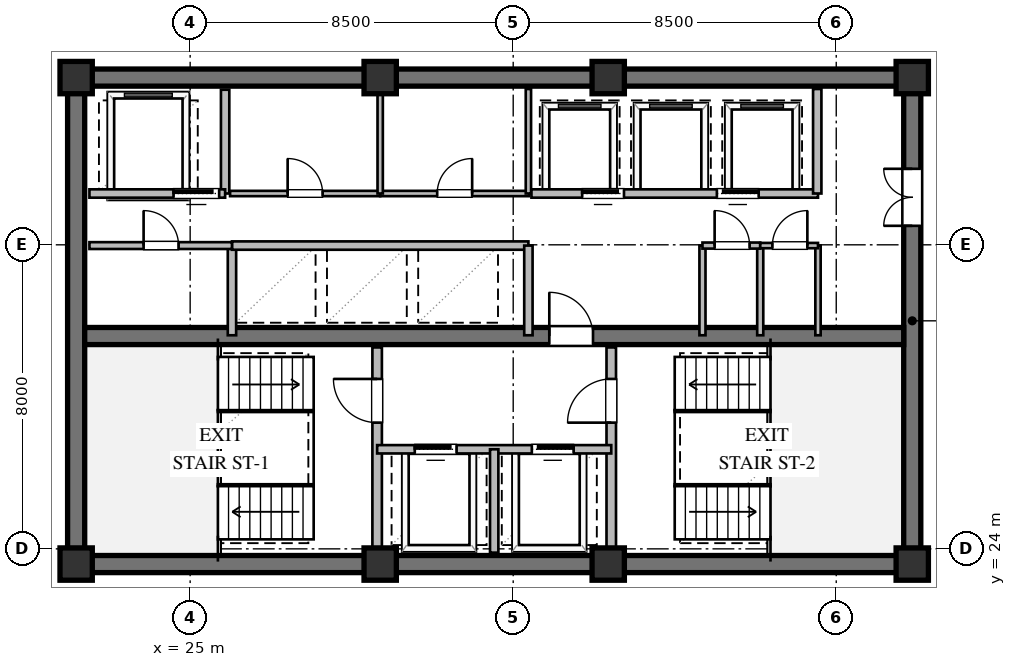
"""IFC4 building model, lengths in metres.
Left out: names, types, materials, properties, quantities, classifications, styles, units other than length and angle.
Written with IfcOpenShell. Run it as: python <this file> out.ifc"""

import sys

from ifc_helpers import new_model, si_unit, direction, frame, frame_2d, origin, origin_2d, place, context, subcontext, project, spatial, rectangle, extrude, element, fill, save


model = new_model("IFC4")
c1 = context("Model", 3, precision=1e-05, world=origin(), true_north=direction((0.0, 1.0)))
c2 = subcontext(c1, "Body", "Model", "MODEL_VIEW")
j1 = project(units=[si_unit("LENGTHUNIT", "METRE"), si_unit("PLANEANGLEUNIT", "RADIAN")], contexts=[c1])
p1 = place(None, origin())
s1 = spatial("IfcSite", under=j1, at=p1, CompositionType="ELEMENT")
p2 = place(p1, origin())
s2 = spatial("IfcBuilding", under=s1, at=p2, CompositionType="ELEMENT")
p3 = place(p2, frame((0.0, 0.0, 187.2)))
s3 = spatial("IfcBuildingStorey", under=s2, at=p3, CompositionType="ELEMENT", Elevation=187.2)
for number, where, z_axis, x_axis in (
    (1, (21.775, 23.6, 0.0), (0.0, 0.0, 1.0), (1.0, 0.0, 0.0)),
    (2, (21.775, 36.4, 0.0), (0.0, 0.0, 1.0), (1.0, 0.0, 0.0)),
):
    element("IfcWall", number, at=place(p3, frame(where, z_axis=z_axis, x_axis=x_axis)), inside=s3, PredefinedType="SHEAR", context=c2, shape_type="SweptSolid", body=[
        extrude(rectangle(XDim=22.45, YDim=0.45, at=frame_2d((11.225, 0.0))), origin(), (0.0, 0.0, 1.0), 3.28),
    ])
p4 = place(p3, frame((22.0, 23.825, 0.0), z_axis=(0.0, 0.0, 1.0), x_axis=(0.0, 1.0, 0.0)))
e3 = element("IfcWall", 3, at=p4, inside=s3, PredefinedType="SHEAR", context=c2, shape_type="SweptSolid", body=[
    extrude(rectangle(XDim=12.35, YDim=0.45, at=frame_2d((6.175, 0.0))), origin(), (0.0, 0.0, 1.0), 3.28),
])
p5 = place(p3, frame((44.0, 23.825, 0.0), z_axis=(0.0, 0.0, 1.0), x_axis=(0.0, 1.0, 0.0)))
e4 = element("IfcWall", 4, at=p5, inside=s3, PredefinedType="SHEAR", context=c2, shape_type="SweptSolid", body=[
    extrude(rectangle(XDim=12.35, YDim=0.45, at=frame_2d((6.175, 0.0))), origin(), (0.0, 0.0, 1.0), 3.28),
])
p6 = place(p5, frame((8.675, 0.0, 0.0)))
e5 = element("IfcOpeningElement", 5, at=p6, cuts=e4, PredefinedType="OPENING", context=c2, shape_type="SweptSolid", body=[
    extrude(rectangle(XDim=1.5, YDim=2.15, at=frame_2d((0.75, 1.075))), frame((0.0, 0.235, 0.0), z_axis=(0.0, -1.0, 0.0), x_axis=(1.0, 0.0, 0.0)), (0.0, 0.0, 1.0), 0.47),
])
p7 = place(p3, frame((22.225, 29.6, 0.0), z_axis=(0.0, 0.0, 1.0), x_axis=(1.0, 0.0, 0.0)))
e6 = element("IfcWall", 6, at=p7, inside=s3, PredefinedType="SHEAR", context=c2, shape_type="SweptSolid", body=[
    extrude(rectangle(XDim=21.55, YDim=0.45, at=frame_2d((10.775, 0.0))), origin(), (0.0, 0.0, 1.0), 3.28),
])
p8 = place(p7, frame((12.225, 0.0, 0.0)))
e7 = element("IfcOpeningElement", 7, at=p8, cuts=e6, PredefinedType="OPENING", context=c2, shape_type="SweptSolid", body=[
    extrude(rectangle(XDim=1.15, YDim=2.1, at=frame_2d((0.575, 1.05))), frame((0.0, 0.235, 0.0), z_axis=(0.0, -1.0, 0.0), x_axis=(1.0, 0.0, 0.0)), (0.0, 0.0, 1.0), 0.47),
])
for number, where, z_axis, x_axis in (
    (8, (22.0, 23.6, 0.0), (0.0, 0.0, 1.0), (1.0, 0.0, 0.0)),
    (9, (30.0, 23.6, 0.0), (0.0, 0.0, 1.0), (1.0, 0.0, 0.0)),
    (10, (36.0, 23.6, 0.0), (0.0, 0.0, 1.0), (1.0, 0.0, 0.0)),
    (11, (44.0, 23.6, 0.0), (0.0, 0.0, 1.0), (1.0, 0.0, 0.0)),
    (12, (44.0, 36.4, 0.0), (0.0, 0.0, 1.0), (1.0, 0.0, 0.0)),
    (13, (36.0, 36.4, 0.0), (0.0, 0.0, 1.0), (1.0, 0.0, 0.0)),
    (14, (30.0, 36.4, 0.0), (0.0, 0.0, 1.0), (1.0, 0.0, 0.0)),
    (15, (22.0, 36.4, 0.0), (0.0, 0.0, 1.0), (1.0, 0.0, 0.0)),
):
    element("IfcColumn", number, at=place(p3, frame(where, z_axis=z_axis, x_axis=x_axis)), inside=s3, PredefinedType="COLUMN", context=c2, shape_type="SweptSolid", body=[
        extrude(rectangle(XDim=0.85, YDim=0.85, at=origin_2d()), origin(), (0.0, 0.0, 1.0), 3.6),
    ])
p9 = place(p3, frame((29.92, 23.9, 0.0), z_axis=(0.0, 0.0, 1.0), x_axis=(0.0, 1.0, 0.0)))
e16 = element("IfcWall", 16, at=p9, inside=s3, PredefinedType="SOLIDWALL", context=c2, shape_type="SweptSolid", body=[
    extrude(rectangle(XDim=5.4, YDim=0.25, at=frame_2d((2.7, 0.0))), origin(), (0.0, 0.0, 1.0), 3.28),
])
p10 = place(p9, frame((3.421, 0.0, 0.0)))
e17 = element("IfcOpeningElement", 17, at=p10, cuts=e16, PredefinedType="OPENING", context=c2, shape_type="SweptSolid", body=[
    extrude(rectangle(XDim=1.15, YDim=2.1, at=frame_2d((0.575, 1.05))), frame((0.0, 0.135, 0.0), z_axis=(0.0, -1.0, 0.0), x_axis=(1.0, 0.0, 0.0)), (0.0, 0.0, 1.0), 0.27),
])
p11 = place(p3, frame((36.08, 23.9, 0.0), z_axis=(0.0, 0.0, 1.0), x_axis=(0.0, 1.0, 0.0)))
e18 = element("IfcWall", 18, at=p11, inside=s3, PredefinedType="SOLIDWALL", context=c2, shape_type="SweptSolid", body=[
    extrude(rectangle(XDim=5.4, YDim=0.25, at=frame_2d((2.7, 0.0))), origin(), (0.0, 0.0, 1.0), 3.28),
])
p12 = place(p11, frame((3.421, 0.0, 0.0)))
e19 = element("IfcOpeningElement", 19, at=p12, cuts=e18, PredefinedType="OPENING", context=c2, shape_type="SweptSolid", body=[
    extrude(rectangle(XDim=1.15, YDim=2.1, at=frame_2d((0.575, 1.05))), frame((0.0, 0.135, 0.0), z_axis=(0.0, -1.0, 0.0), x_axis=(1.0, 0.0, 0.0)), (0.0, 0.0, 1.0), 0.27),
])
p13 = place(p3, frame((29.92, 26.62, 0.0), z_axis=(0.0, 0.0, 1.0), x_axis=(1.0, 0.0, 0.0)))
e20 = element("IfcWall", 20, at=p13, inside=s3, PredefinedType="SOLIDWALL", context=c2, shape_type="SweptSolid", body=[
    extrude(rectangle(XDim=6.16, YDim=0.22, at=frame_2d((3.08, 0.0))), origin(), (0.0, 0.0, 1.0), 3.28),
])
p14 = place(p13, frame((0.99, 0.0, 0.0)))
e21 = element("IfcOpeningElement", 21, at=p14, cuts=e20, PredefinedType="OPENING", context=c2, shape_type="SweptSolid", body=[
    extrude(rectangle(XDim=1.1, YDim=2.1, at=frame_2d((0.55, 1.05))), frame((0.0, 0.12, 0.0), z_axis=(0.0, -1.0, 0.0), x_axis=(1.0, 0.0, 0.0)), (0.0, 0.0, 1.0), 0.24),
])
p15 = place(p13, frame((4.07, 0.0, 0.0)))
e22 = element("IfcOpeningElement", 22, at=p15, cuts=e20, PredefinedType="OPENING", context=c2, shape_type="SweptSolid", body=[
    extrude(rectangle(XDim=1.1, YDim=2.1, at=frame_2d((0.55, 1.05))), frame((0.0, 0.12, 0.0), z_axis=(0.0, -1.0, 0.0), x_axis=(1.0, 0.0, 0.0)), (0.0, 0.0, 1.0), 0.24),
])
p16 = place(p3, frame((33.0, 23.9, 0.0), z_axis=(0.0, 0.0, 1.0), x_axis=(0.0, 1.0, 0.0)))
e23 = element("IfcWall", 23, at=p16, inside=s3, PredefinedType="SOLIDWALL", context=c2, shape_type="SweptSolid", body=[
    extrude(rectangle(XDim=2.72, YDim=0.22, at=frame_2d((1.36, 0.0))), origin(), (0.0, 0.0, 1.0), 3.28),
])
p17 = place(p3, frame((25.92, 33.35, 0.0), z_axis=(0.0, 0.0, 1.0), x_axis=(0.0, 1.0, 0.0)))
e24 = element("IfcWall", 24, at=p17, inside=s3, PredefinedType="SOLIDWALL", context=c2, shape_type="SweptSolid", body=[
    extrude(rectangle(XDim=2.73, YDim=0.22, at=frame_2d((1.365, 0.0))), origin(), (0.0, 0.0, 1.0), 3.28),
])
p18 = place(p3, frame((22.35, 33.35, 0.0), z_axis=(0.0, 0.0, 1.0), x_axis=(1.0, 0.0, 0.0)))
e25 = element("IfcWall", 25, at=p18, inside=s3, PredefinedType="SOLIDWALL", context=c2, shape_type="SweptSolid", body=[
    extrude(rectangle(XDim=3.57, YDim=0.22, at=frame_2d((1.785, 0.0))), origin(), (0.0, 0.0, 1.0), 3.28),
])
p19 = place(p18, frame((2.213, 0.0, 0.0)))
e26 = element("IfcOpeningElement", 26, at=p19, cuts=e25, PredefinedType="OPENING", context=c2, shape_type="SweptSolid", body=[
    extrude(rectangle(XDim=1.2, YDim=2.1, at=frame_2d((0.6, 1.05))), frame((0.0, 0.12, 0.0), z_axis=(0.0, -1.0, 0.0), x_axis=(1.0, 0.0, 0.0)), (0.0, 0.0, 1.0), 0.24),
])
p20 = place(p3, frame((26.1, 29.62, 0.0), z_axis=(0.0, 0.0, 1.0), x_axis=(0.0, 1.0, 0.0)))
e27 = element("IfcWall", 27, at=p20, inside=s3, PredefinedType="SOLIDWALL", context=c2, shape_type="SweptSolid", body=[
    extrude(rectangle(XDim=2.36, YDim=0.22, at=frame_2d((1.18, 0.0))), origin(), (0.0, 0.0, 1.0), 3.28),
])
p21 = place(p3, frame((26.1, 31.98, 0.0), z_axis=(0.0, 0.0, 1.0), x_axis=(1.0, 0.0, 0.0)))
e28 = element("IfcWall", 28, at=p21, inside=s3, PredefinedType="SOLIDWALL", context=c2, shape_type="SweptSolid", body=[
    extrude(rectangle(XDim=7.8, YDim=0.22, at=frame_2d((3.9, 0.0))), origin(), (0.0, 0.0, 1.0), 3.28),
])
p22 = place(p3, frame((33.9, 29.62, 0.0), z_axis=(0.0, 0.0, 1.0), x_axis=(0.0, 1.0, 0.0)))
e29 = element("IfcWall", 29, at=p22, inside=s3, PredefinedType="SOLIDWALL", context=c2, shape_type="SweptSolid", body=[
    extrude(rectangle(XDim=2.36, YDim=0.22, at=frame_2d((1.18, 0.0))), origin(), (0.0, 0.0, 1.0), 3.28),
])
p23 = place(p3, frame((26.05, 33.35, 0.0), z_axis=(0.0, 0.0, 1.0), x_axis=(1.0, 0.0, 0.0)))
e30 = element("IfcWall", 30, at=p23, inside=s3, PredefinedType="PARTITIONING", context=c2, shape_type="SweptSolid", body=[
    extrude(rectangle(XDim=3.95, YDim=0.14, at=frame_2d((1.975, 0.0))), origin(), (0.0, 0.0, 1.0), 3.28),
])
p24 = place(p23, frame((1.515, 0.0, 0.0)))
e31 = element("IfcOpeningElement", 31, at=p24, cuts=e30, PredefinedType="OPENING", context=c2, shape_type="SweptSolid", body=[
    extrude(rectangle(XDim=0.92, YDim=2.1, at=frame_2d((0.46, 1.05))), frame((0.0, 0.08, 0.0), z_axis=(0.0, -1.0, 0.0), x_axis=(1.0, 0.0, 0.0)), (0.0, 0.0, 1.0), 0.16),
])
p25 = place(p3, frame((30.0, 33.35, 0.0), z_axis=(0.0, 0.0, 1.0), x_axis=(1.0, 0.0, 0.0)))
e32 = element("IfcWall", 32, at=p25, inside=s3, PredefinedType="PARTITIONING", context=c2, shape_type="SweptSolid", body=[
    extrude(rectangle(XDim=3.92, YDim=0.14, at=frame_2d((1.96, 0.0))), origin(), (0.0, 0.0, 1.0), 3.28),
])
p26 = place(p25, frame((1.5, 0.0, 0.0)))
e33 = element("IfcOpeningElement", 33, at=p26, cuts=e32, PredefinedType="OPENING", context=c2, shape_type="SweptSolid", body=[
    extrude(rectangle(XDim=0.92, YDim=2.1, at=frame_2d((0.46, 1.05))), frame((0.0, 0.08, 0.0), z_axis=(0.0, -1.0, 0.0), x_axis=(1.0, 0.0, 0.0)), (0.0, 0.0, 1.0), 0.16),
])
for number, where, z_axis, x_axis in (
    (34, (30.0, 33.35, 0.0), (0.0, 0.0, 1.0), (0.0, 1.0, 0.0)),
    (35, (33.9, 33.35, 0.0), (0.0, 0.0, 1.0), (0.0, 1.0, 0.0)),
):
    element("IfcWall", number, at=place(p3, frame(where, z_axis=z_axis, x_axis=x_axis)), inside=s3, PredefinedType="PARTITIONING", context=c2, shape_type="SweptSolid", body=[
        extrude(rectangle(XDim=2.75, YDim=0.14, at=frame_2d((1.375, 0.0))), origin(), (0.0, 0.0, 1.0), 3.28),
    ])
p27 = place(p3, frame((33.98, 33.35, 0.0), z_axis=(0.0, 0.0, 1.0), x_axis=(1.0, 0.0, 0.0)))
e36 = element("IfcWall", 36, at=p27, inside=s3, PredefinedType="SOLIDWALL", context=c2, shape_type="SweptSolid", body=[
    extrude(rectangle(XDim=7.54, YDim=0.22, at=frame_2d((3.77, 0.0))), origin(), (0.0, 0.0, 1.0), 3.28),
])
p28 = place(p27, frame((1.335, 0.0, 0.0)))
e37 = element("IfcOpeningElement", 37, at=p28, cuts=e36, PredefinedType="OPENING", context=c2, shape_type="SweptSolid", body=[
    extrude(rectangle(XDim=1.1, YDim=2.1, at=frame_2d((0.55, 1.05))), frame((0.0, 0.12, 0.0), z_axis=(0.0, -1.0, 0.0), x_axis=(1.0, 0.0, 0.0)), (0.0, 0.0, 1.0), 0.24),
])
p29 = place(p27, frame((4.879, 0.0, 0.0)))
e38 = element("IfcOpeningElement", 38, at=p29, cuts=e36, PredefinedType="OPENING", context=c2, shape_type="SweptSolid", body=[
    extrude(rectangle(XDim=1.1, YDim=2.1, at=frame_2d((0.55, 1.05))), frame((0.0, 0.12, 0.0), z_axis=(0.0, -1.0, 0.0), x_axis=(1.0, 0.0, 0.0)), (0.0, 0.0, 1.0), 0.24),
])
p30 = place(p3, frame((41.5, 33.35, 0.0), z_axis=(0.0, 0.0, 1.0), x_axis=(0.0, 1.0, 0.0)))
e39 = element("IfcWall", 39, at=p30, inside=s3, PredefinedType="SOLIDWALL", context=c2, shape_type="SweptSolid", body=[
    extrude(rectangle(XDim=2.75, YDim=0.22, at=frame_2d((1.375, 0.0))), origin(), (0.0, 0.0, 1.0), 3.28),
])
p31 = place(p3, frame((22.35, 31.98, 0.0), z_axis=(0.0, 0.0, 1.0), x_axis=(1.0, 0.0, 0.0)))
e40 = element("IfcWall", 40, at=p31, inside=s3, PredefinedType="PARTITIONING", context=c2, shape_type="SweptSolid", body=[
    extrude(rectangle(XDim=3.75, YDim=0.18, at=frame_2d((1.875, 0.0))), origin(), (0.0, 0.0, 1.0), 3.28),
])
p32 = place(p31, frame((1.425, 0.0, 0.0)))
e41 = element("IfcOpeningElement", 41, at=p32, cuts=e40, PredefinedType="OPENING", context=c2, shape_type="SweptSolid", body=[
    extrude(rectangle(XDim=0.92, YDim=2.1, at=frame_2d((0.46, 1.05))), frame((0.0, 0.1, 0.0), z_axis=(0.0, -1.0, 0.0), x_axis=(1.0, 0.0, 0.0)), (0.0, 0.0, 1.0), 0.2),
])
for number, where, z_axis, x_axis in (
    (42, (38.48, 29.62, 0.0), (0.0, 0.0, 1.0), (0.0, 1.0, 0.0)),
    (43, (40.0, 29.62, 0.0), (0.0, 0.0, 1.0), (0.0, 1.0, 0.0)),
):
    element("IfcWall", number, at=place(p3, frame(where, z_axis=z_axis, x_axis=x_axis)), inside=s3, PredefinedType="PLUMBINGWALL", context=c2, shape_type="SweptSolid", body=[
        extrude(rectangle(XDim=2.36, YDim=0.16, at=frame_2d((1.18, 0.0))), origin(), (0.0, 0.0, 1.0), 3.28),
    ])
p33 = place(p3, frame((41.52, 29.62, 0.0), z_axis=(0.0, 0.0, 1.0), x_axis=(0.0, 1.0, 0.0)))
e44 = element("IfcWall", 44, at=p33, inside=s3, PredefinedType="PARTITIONING", context=c2, shape_type="SweptSolid", body=[
    extrude(rectangle(XDim=2.36, YDim=0.14, at=frame_2d((1.18, 0.0))), origin(), (0.0, 0.0, 1.0), 3.28),
])
p34 = place(p3, frame((38.48, 31.98, 0.0), z_axis=(0.0, 0.0, 1.0), x_axis=(1.0, 0.0, 0.0)))
e45 = element("IfcWall", 45, at=p34, inside=s3, PredefinedType="PLUMBINGWALL", context=c2, shape_type="SweptSolid", body=[
    extrude(rectangle(XDim=1.52, YDim=0.16, at=frame_2d((0.76, 0.0))), origin(), (0.0, 0.0, 1.0), 3.28),
])
p35 = place(p34, frame((0.32, 0.0, 0.0)))
e46 = element("IfcOpeningElement", 46, at=p35, cuts=e45, PredefinedType="OPENING", context=c2, shape_type="SweptSolid", body=[
    extrude(rectangle(XDim=0.92, YDim=2.1, at=frame_2d((0.46, 1.05))), frame((0.0, 0.09, 0.0), z_axis=(0.0, -1.0, 0.0), x_axis=(1.0, 0.0, 0.0)), (0.0, 0.0, 1.0), 0.18),
])
p36 = place(p3, frame((40.0, 31.98, 0.0), z_axis=(0.0, 0.0, 1.0), x_axis=(1.0, 0.0, 0.0)))
e47 = element("IfcWall", 47, at=p36, inside=s3, PredefinedType="PARTITIONING", context=c2, shape_type="SweptSolid", body=[
    extrude(rectangle(XDim=1.52, YDim=0.14, at=frame_2d((0.76, 0.0))), origin(), (0.0, 0.0, 1.0), 3.28),
])
p37 = place(p36, frame((0.32, 0.0, 0.0)))
e48 = element("IfcOpeningElement", 48, at=p37, cuts=e47, PredefinedType="OPENING", context=c2, shape_type="SweptSolid", body=[
    extrude(rectangle(XDim=0.92, YDim=2.1, at=frame_2d((0.46, 1.05))), frame((0.0, 0.08, 0.0), z_axis=(0.0, -1.0, 0.0), x_axis=(1.0, 0.0, 0.0)), (0.0, 0.0, 1.0), 0.16),
])
p38 = place(p10, origin())
e49 = element("IfcDoor", 49, at=p38, inside=s3, OperationType="SINGLE_SWING_RIGHT", PredefinedType="DOOR", context=c2, shape_type="SweptSolid", body=[
    extrude(rectangle(XDim=1.15, YDim=2.1, at=frame_2d((0.575, 1.05))), frame((0.0, 0.025, 0.0), z_axis=(0.0, -1.0, 0.0), x_axis=(1.0, 0.0, 0.0)), (0.0, 0.0, 1.0), 0.05),
])
fill(e17, e49)
p39 = place(p12, origin())
e50 = element("IfcDoor", 50, at=p39, inside=s3, OperationType="SINGLE_SWING_LEFT", PredefinedType="DOOR", context=c2, shape_type="SweptSolid", body=[
    extrude(rectangle(XDim=1.15, YDim=2.1, at=frame_2d((0.575, 1.05))), frame((0.0, 0.025, 0.0), z_axis=(0.0, -1.0, 0.0), x_axis=(1.0, 0.0, 0.0)), (0.0, 0.0, 1.0), 0.05),
])
fill(e19, e50)
p40 = place(p14, origin())
e51 = element("IfcDoor", 51, at=p40, inside=s3, OperationType="SLIDING_TO_LEFT", PredefinedType="DOOR", context=c2, shape_type="SweptSolid", body=[
    extrude(rectangle(XDim=1.1, YDim=2.1, at=frame_2d((0.55, 1.05))), frame((0.0, 0.025, 0.0), z_axis=(0.0, -1.0, 0.0), x_axis=(1.0, 0.0, 0.0)), (0.0, 0.0, 1.0), 0.05),
])
fill(e21, e51)
p41 = place(p15, origin())
e52 = element("IfcDoor", 52, at=p41, inside=s3, OperationType="SLIDING_TO_RIGHT", PredefinedType="DOOR", context=c2, shape_type="SweptSolid", body=[
    extrude(rectangle(XDim=1.1, YDim=2.1, at=frame_2d((0.55, 1.05))), frame((0.0, 0.025, 0.0), z_axis=(0.0, -1.0, 0.0), x_axis=(1.0, 0.0, 0.0)), (0.0, 0.0, 1.0), 0.05),
])
fill(e22, e52)
p42 = place(p8, origin())
e53 = element("IfcDoor", 53, at=p42, inside=s3, OperationType="SINGLE_SWING_LEFT", PredefinedType="DOOR", context=c2, shape_type="SweptSolid", body=[
    extrude(rectangle(XDim=1.15, YDim=2.1, at=frame_2d((0.575, 1.05))), frame((0.0, 0.025, 0.0), z_axis=(0.0, -1.0, 0.0), x_axis=(1.0, 0.0, 0.0)), (0.0, 0.0, 1.0), 0.05),
])
fill(e7, e53)
p43 = place(p6, origin())
e54 = element("IfcDoor", 54, at=p43, inside=s3, OperationType="DOUBLE_DOOR_SINGLE_SWING", PredefinedType="DOOR", context=c2, shape_type="SweptSolid", body=[
    extrude(rectangle(XDim=1.5, YDim=2.15, at=frame_2d((0.75, 1.075))), frame((0.0, 0.025, 0.0), z_axis=(0.0, -1.0, 0.0), x_axis=(1.0, 0.0, 0.0)), (0.0, 0.0, 1.0), 0.05),
])
fill(e5, e54)
p44 = place(p19, origin())
e55 = element("IfcDoor", 55, at=p44, inside=s3, OperationType="SLIDING_TO_LEFT", PredefinedType="DOOR", context=c2, shape_type="SweptSolid", body=[
    extrude(rectangle(XDim=1.2, YDim=2.1, at=frame_2d((0.6, 1.05))), frame((0.0, 0.025, 0.0), z_axis=(0.0, -1.0, 0.0), x_axis=(1.0, 0.0, 0.0)), (0.0, 0.0, 1.0), 0.05),
])
fill(e26, e55)
p45 = place(p24, origin())
e56 = element("IfcDoor", 56, at=p45, inside=s3, OperationType="SINGLE_SWING_LEFT", PredefinedType="DOOR", context=c2, shape_type="SweptSolid", body=[
    extrude(rectangle(XDim=0.92, YDim=2.1, at=frame_2d((0.46, 1.05))), frame((0.0, 0.025, 0.0), z_axis=(0.0, -1.0, 0.0), x_axis=(1.0, 0.0, 0.0)), (0.0, 0.0, 1.0), 0.05),
])
fill(e31, e56)
p46 = place(p26, origin())
e57 = element("IfcDoor", 57, at=p46, inside=s3, OperationType="SINGLE_SWING_RIGHT", PredefinedType="DOOR", context=c2, shape_type="SweptSolid", body=[
    extrude(rectangle(XDim=0.92, YDim=2.1, at=frame_2d((0.46, 1.05))), frame((0.0, 0.025, 0.0), z_axis=(0.0, -1.0, 0.0), x_axis=(1.0, 0.0, 0.0)), (0.0, 0.0, 1.0), 0.05),
])
fill(e33, e57)
p47 = place(p28, origin())
e58 = element("IfcDoor", 58, at=p47, inside=s3, OperationType="SLIDING_TO_LEFT", PredefinedType="DOOR", context=c2, shape_type="SweptSolid", body=[
    extrude(rectangle(XDim=1.1, YDim=2.1, at=frame_2d((0.55, 1.05))), frame((0.0, 0.025, 0.0), z_axis=(0.0, -1.0, 0.0), x_axis=(1.0, 0.0, 0.0)), (0.0, 0.0, 1.0), 0.05),
])
fill(e37, e58)
p48 = place(p29, origin())
e59 = element("IfcDoor", 59, at=p48, inside=s3, OperationType="SLIDING_TO_RIGHT", PredefinedType="DOOR", context=c2, shape_type="SweptSolid", body=[
    extrude(rectangle(XDim=1.1, YDim=2.1, at=frame_2d((0.55, 1.05))), frame((0.0, 0.025, 0.0), z_axis=(0.0, -1.0, 0.0), x_axis=(1.0, 0.0, 0.0)), (0.0, 0.0, 1.0), 0.05),
])
fill(e38, e59)
p49 = place(p32, origin())
e60 = element("IfcDoor", 60, at=p49, inside=s3, OperationType="SINGLE_SWING_LEFT", PredefinedType="DOOR", context=c2, shape_type="SweptSolid", body=[
    extrude(rectangle(XDim=0.92, YDim=2.1, at=frame_2d((0.46, 1.05))), frame((0.0, 0.025, 0.0), z_axis=(0.0, -1.0, 0.0), x_axis=(1.0, 0.0, 0.0)), (0.0, 0.0, 1.0), 0.05),
])
fill(e41, e60)
p50 = place(p35, origin())
e61 = element("IfcDoor", 61, at=p50, inside=s3, OperationType="SINGLE_SWING_LEFT", PredefinedType="DOOR", context=c2, shape_type="SweptSolid", body=[
    extrude(rectangle(XDim=0.92, YDim=2.1, at=frame_2d((0.46, 1.05))), frame((0.0, 0.025, 0.0), z_axis=(0.0, -1.0, 0.0), x_axis=(1.0, 0.0, 0.0)), (0.0, 0.0, 1.0), 0.05),
])
fill(e46, e61)
p51 = place(p37, origin())
e62 = element("IfcDoor", 62, at=p51, inside=s3, OperationType="SINGLE_SWING_RIGHT", PredefinedType="DOOR", context=c2, shape_type="SweptSolid", body=[
    extrude(rectangle(XDim=0.92, YDim=2.1, at=frame_2d((0.46, 1.05))), frame((0.0, 0.025, 0.0), z_axis=(0.0, -1.0, 0.0), x_axis=(1.0, 0.0, 0.0)), (0.0, 0.0, 1.0), 0.05),
])
fill(e48, e62)
save(model, sys.argv[1])
